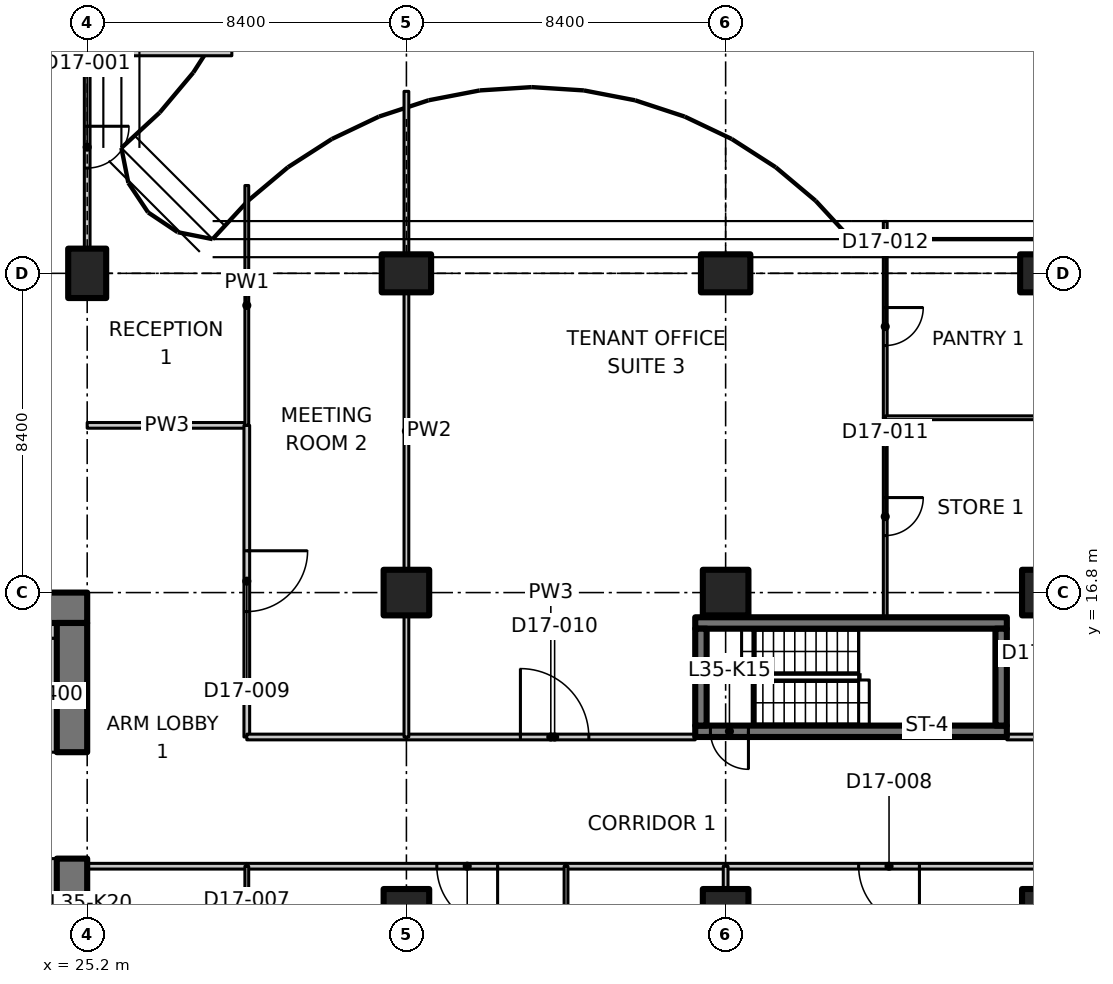
"""IFC4 building model, lengths in metres.
Left out: names, types, materials, properties, quantities, classifications, styles, units other than length and angle.
Written with IfcOpenShell. Run it as: python <this file> out.ifc"""

import sys

from ifc_helpers import new_model, si_unit, direction, frame, frame_2d, origin, origin_2d, place, context, subcontext, project, spatial, polyline, rectangle, outline, extrude, element, fill, save


model = new_model("IFC4")
c1 = context("Model", 3, precision=1e-05, world=origin(), true_north=direction((0.0, 1.0)))
c2 = subcontext(c1, "Body", "Model", "MODEL_VIEW")
j1 = project(units=[si_unit("LENGTHUNIT", "METRE"), si_unit("PLANEANGLEUNIT", "RADIAN")], contexts=[c1])
p1 = place(None, origin())
s1 = spatial("IfcSite", under=j1, at=p1, CompositionType="ELEMENT")
p2 = place(p1, origin())
s2 = spatial("IfcBuilding", under=s1, at=p2, CompositionType="ELEMENT")
p3 = place(p2, frame((0.0, 0.0, 142.1)))
s3 = spatial("IfcBuildingStorey", under=s2, at=p3, CompositionType="ELEMENT", Elevation=142.1)
p4 = place(p3, frame((25.2, 25.2, 0.0), z_axis=(0.0, 0.0, 1.0), x_axis=(1.0, 0.0, 0.0)))
e1 = element("IfcColumn", 1, at=p4, inside=s3, PredefinedType="COLUMN", context=c2, shape_type="SweptSolid", body=[
    extrude(rectangle(XDim=1.0, YDim=1.3, at=origin_2d()), origin(), (0.0, 0.0, 1.0), 3.35),
])
for number, where, z_axis, x_axis in (
    (2, (33.6, 8.4, 0.0), (0.0, 0.0, 1.0), (1.0, 0.0, 0.0)),
    (3, (33.6, 16.8, 0.0), (0.0, 0.0, 1.0), (1.0, 0.0, 0.0)),
):
    element("IfcColumn", number, at=place(p3, frame(where, z_axis=z_axis, x_axis=x_axis)), inside=s3, PredefinedType="COLUMN", context=c2, shape_type="SweptSolid", body=[
        extrude(rectangle(XDim=1.2, YDim=1.2, at=origin_2d()), origin(), (0.0, 0.0, 1.0), 3.35),
    ])
p5 = place(p3, frame((33.6, 25.2, 0.0), z_axis=(0.0, 0.0, 1.0), x_axis=(0.0, 1.0, 0.0)))
e4 = element("IfcColumn", 4, at=p5, inside=s3, PredefinedType="COLUMN", context=c2, shape_type="SweptSolid", body=[
    extrude(rectangle(XDim=1.0, YDim=1.3, at=origin_2d()), origin(), (0.0, 0.0, 1.0), 3.35),
])
for number, where, z_axis, x_axis in (
    (5, (42.0, 8.4, 0.0), (0.0, 0.0, 1.0), (1.0, 0.0, 0.0)),
    (6, (42.0, 16.8, 0.0), (0.0, 0.0, 1.0), (1.0, 0.0, 0.0)),
):
    element("IfcColumn", number, at=place(p3, frame(where, z_axis=z_axis, x_axis=x_axis)), inside=s3, PredefinedType="COLUMN", context=c2, shape_type="SweptSolid", body=[
        extrude(rectangle(XDim=1.2, YDim=1.2, at=origin_2d()), origin(), (0.0, 0.0, 1.0), 3.35),
    ])
p6 = place(p3, frame((42.0, 25.2, 0.0), z_axis=(0.0, 0.0, 1.0), x_axis=(0.0, 1.0, 0.0)))
e7 = element("IfcColumn", 7, at=p6, inside=s3, PredefinedType="COLUMN", context=c2, shape_type="SweptSolid", body=[
    extrude(rectangle(XDim=1.0, YDim=1.3, at=origin_2d()), origin(), (0.0, 0.0, 1.0), 3.35),
])
for number, where, z_axis, x_axis in (
    (8, (50.4, 8.4, 0.0), (0.0, 0.0, 1.0), (1.0, 0.0, 0.0)),
    (9, (50.4, 16.8, 0.0), (0.0, 0.0, 1.0), (1.0, 0.0, 0.0)),
):
    element("IfcColumn", number, at=place(p3, frame(where, z_axis=z_axis, x_axis=x_axis)), inside=s3, PredefinedType="COLUMN", context=c2, shape_type="SweptSolid", body=[
        extrude(rectangle(XDim=1.2, YDim=1.2, at=origin_2d()), origin(), (0.0, 0.0, 1.0), 3.35),
    ])
p7 = place(p3, frame((50.4, 25.2, 0.0), z_axis=(0.0, 0.0, 1.0), x_axis=(0.0, 1.0, 0.0)))
e10 = element("IfcColumn", 10, at=p7, inside=s3, PredefinedType="COLUMN", context=c2, shape_type="SweptSolid", body=[
    extrude(rectangle(XDim=1.0, YDim=1.3, at=origin_2d()), origin(), (0.0, 0.0, 1.0), 3.35),
])
p8 = place(p3, frame((23.8, 16.4, 0.0), z_axis=(0.0, 0.0, 1.0), x_axis=(1.0, 0.0, 0.0)))
e11 = element("IfcWall", 11, at=p8, inside=s3, PredefinedType="SHEAR", context=c2, shape_type="SweptSolid", body=[
    extrude(rectangle(XDim=1.4, YDim=0.8, at=frame_2d((0.7, 0.0))), origin(), (0.0, 0.0, 1.0), 3.35),
])
p9 = place(p3, frame((24.8, 0.8, 0.0), z_axis=(0.0, 0.0, 1.0), x_axis=(0.0, 1.0, 0.0)))
e12 = element("IfcWall", 12, at=p9, inside=s3, PredefinedType="SHEAR", context=c2, shape_type="SweptSolid", body=[
    extrude(rectangle(XDim=9.0, YDim=0.8, at=frame_2d((4.5, 0.0))), origin(), (0.0, 0.0, 1.0), 3.35),
])
p10 = place(p3, frame((24.8, 12.6, 0.0), z_axis=(0.0, 0.0, 1.0), x_axis=(0.0, 1.0, 0.0)))
e13 = element("IfcWall", 13, at=p10, inside=s3, PredefinedType="SHEAR", context=c2, shape_type="SweptSolid", body=[
    extrude(rectangle(XDim=3.4, YDim=0.8, at=frame_2d((1.7, 0.0))), origin(), (0.0, 0.0, 1.0), 3.35),
])
p11 = place(p3, frame((24.2, 12.6, 0.0), z_axis=(0.0, 0.0, 1.0), x_axis=(0.0, 1.0, 0.0)))
e14 = element("IfcWall", 14, at=p11, inside=s3, PredefinedType="PARTITIONING", context=c2, shape_type="SweptSolid", body=[
    extrude(rectangle(XDim=3.0, YDim=0.4, at=frame_2d((1.5, 0.0))), origin(), (0.0, 0.0, 1.0), 3.35),
])
p12 = place(p3, frame((23.8, 15.8, 0.0), z_axis=(0.0, 0.0, 1.0), x_axis=(1.0, 0.0, 0.0)))
e15 = element("IfcWall", 15, at=p12, inside=s3, PredefinedType="PARTITIONING", context=c2, shape_type="SweptSolid", body=[
    extrude(rectangle(XDim=0.6, YDim=0.4, at=frame_2d((0.3, 0.0))), origin(), (0.0, 0.0, 1.0), 3.35),
])
p13 = place(p3, frame((49.4, 13.15, 0.0), z_axis=(0.0, 0.0, 1.0), x_axis=(-1.0, 0.0, 0.0)))
e16 = element("IfcWall", 16, at=p13, inside=s3, PredefinedType="SHEAR", context=c2, shape_type="SweptSolid", body=[
    extrude(rectangle(XDim=8.2, YDim=0.3, at=frame_2d((4.1, 0.0))), origin(), (0.0, 0.0, 1.0), 3.35),
])
p14 = place(p13, frame((6.8, 0.0, 0.0)))
e17 = element("IfcOpeningElement", 17, at=p14, cuts=e16, PredefinedType="OPENING", context=c2, shape_type="SweptSolid", body=[
    extrude(rectangle(XDim=1.0, YDim=2.1, at=frame_2d((0.5, 1.05))), frame((0.0, 0.16, 0.0), z_axis=(0.0, -1.0, 0.0), x_axis=(1.0, 0.0, 0.0)), (0.0, 0.0, 1.0), 0.32),
])
p15 = place(p3, frame((41.2, 16.0, 0.0), z_axis=(0.0, 0.0, 1.0), x_axis=(1.0, 0.0, 0.0)))
e18 = element("IfcWall", 18, at=p15, inside=s3, PredefinedType="SHEAR", context=c2, shape_type="SweptSolid", body=[
    extrude(rectangle(XDim=8.2, YDim=0.3, at=frame_2d((4.1, 0.0))), origin(), (0.0, 0.0, 1.0), 3.35),
])
for number, where, z_axis, x_axis in (
    (19, (41.35, 13.3, 0.0), (0.0, 0.0, 1.0), (0.0, 1.0, 0.0)),
    (20, (49.25, 13.3, 0.0), (0.0, 0.0, 1.0), (0.0, 1.0, 0.0)),
):
    element("IfcWall", number, at=place(p3, frame(where, z_axis=z_axis, x_axis=x_axis)), inside=s3, PredefinedType="SHEAR", context=c2, shape_type="SweptSolid", body=[
        extrude(rectangle(XDim=2.55, YDim=0.3, at=frame_2d((1.275, 0.0))), origin(), (0.0, 0.0, 1.0), 3.35),
    ])
p16 = place(p3, frame((24.2, 4.35, 0.0), z_axis=(0.0, 0.0, 1.0), x_axis=(0.0, 1.0, 0.0)))
e21 = element("IfcWall", 21, at=p16, inside=s3, PredefinedType="PARTITIONING", context=c2, shape_type="SweptSolid", body=[
    extrude(rectangle(XDim=5.45, YDim=0.4, at=frame_2d((2.725, 0.0))), origin(), (0.0, 0.0, 1.0), 3.35),
])
for number, where, z_axis, x_axis in (
    (22, (25.2, 21.2, 0.0), (0.0, 0.0, 1.0), (1.0, 0.0, 0.0)),
    (23, (29.4, 9.6, 0.0), (0.0, 0.0, 1.0), (-1.0, 0.0, 0.0)),
):
    element("IfcWall", number, at=place(p3, frame(where, z_axis=z_axis, x_axis=x_axis)), inside=s3, PredefinedType="PARTITIONING", context=c2, shape_type="SweptSolid", body=[
        extrude(rectangle(XDim=4.2, YDim=0.15, at=frame_2d((2.1, 0.0))), origin(), (0.0, 0.0, 1.0), 3.33),
    ])
p17 = place(p3, frame((29.4, 21.2, 0.0), z_axis=(0.0, 0.0, 1.0), x_axis=(0.0, -1.0, 0.0)))
e24 = element("IfcWall", 24, at=p17, inside=s3, PredefinedType="PARTITIONING", context=c2, shape_type="SweptSolid", body=[
    extrude(rectangle(XDim=8.2, YDim=0.15, at=frame_2d((4.1, 0.0))), origin(), (0.0, 0.0, 1.0), 3.33),
])
p18 = place(p17, frame((3.3, 0.0, 0.0)))
e25 = element("IfcOpeningElement", 25, at=p18, cuts=e24, PredefinedType="OPENING", context=c2, shape_type="SweptSolid", body=[
    extrude(rectangle(XDim=1.6, YDim=2.1, at=frame_2d((0.8, 1.05))), frame((0.0, 0.085, 0.0), z_axis=(0.0, -1.0, 0.0), x_axis=(1.0, 0.0, 0.0)), (0.0, 0.0, 1.0), 0.17),
])
p19 = place(p3, frame((29.4, 27.511, 0.0), z_axis=(0.0, 0.0, 1.0), x_axis=(0.0, -1.0, 0.0)))
e26 = element("IfcWall", 26, at=p19, inside=s3, PredefinedType="PARTITIONING", context=c2, shape_type="SweptSolid", body=[
    extrude(outline(polyline([(0.0, 0.0), (6.311, 0.0), (6.311, 3.33), (2.761, 3.33), (2.759, 2.98), (1.863, 2.98), (1.861, 3.33), (0.236, 3.33), (0.0, 3.33), (0.0, 0.0)])), frame((0.0, 0.05, 0.0), z_axis=(0.0, -1.0, 0.0), x_axis=(1.0, 0.0, 0.0)), (0.0, 0.0, 1.0), 0.1),
])
p20 = place(p3, frame((25.2, 31.0, 0.0), z_axis=(0.0, 0.0, 1.0), x_axis=(0.0, -1.0, 0.0)))
e27 = element("IfcWall", 27, at=p20, inside=s3, PredefinedType="PARTITIONING", context=c2, shape_type="SweptSolid", body=[
    extrude(outline(polyline([(0.0, 0.0), (5.13, 0.0), (5.13, 2.98), (0.0, 2.98), (0.0, 0.0)])), frame((0.0, 0.075, 0.0), z_axis=(0.0, -1.0, 0.0), x_axis=(1.0, 0.0, 0.0)), (0.0, 0.0, 1.0), 0.15),
])
p21 = place(p20, frame((1.93, 0.0, 0.0)))
e28 = element("IfcOpeningElement", 28, at=p21, cuts=e27, PredefinedType="OPENING", context=c2, shape_type="SweptSolid", body=[
    extrude(rectangle(XDim=1.1, YDim=2.1, at=frame_2d((0.55, 1.05))), frame((0.0, 0.085, 0.0), z_axis=(0.0, -1.0, 0.0), x_axis=(1.0, 0.0, 0.0)), (0.0, 0.0, 1.0), 0.17),
])
p22 = place(p3, frame((25.2, 31.0, 0.0), z_axis=(0.0, 0.0, 1.0), x_axis=(1.0, 0.0, 0.0)))
e29 = element("IfcWall", 29, at=p22, inside=s3, PredefinedType="PARTITIONING", context=c2, shape_type="SweptSolid", body=[
    extrude(rectangle(XDim=3.806, YDim=0.15, at=frame_2d((1.903, 0.0))), origin(), (0.0, 0.0, 1.0), 2.98),
])
p23 = place(p3, frame((37.8, 9.6, 0.0), z_axis=(0.0, 0.0, 1.0), x_axis=(-1.0, 0.0, 0.0)))
e30 = element("IfcWall", 30, at=p23, inside=s3, PredefinedType="PARTITIONING", context=c2, shape_type="SweptSolid", body=[
    extrude(rectangle(XDim=8.4, YDim=0.15, at=frame_2d((4.2, 0.0))), origin(), (0.0, 0.0, 1.0), 3.33),
])
p24 = place(p23, frame((1.8, 0.0, 0.0)))
e31 = element("IfcOpeningElement", 31, at=p24, cuts=e30, PredefinedType="OPENING", context=c2, shape_type="SweptSolid", body=[
    extrude(rectangle(XDim=1.6, YDim=2.1, at=frame_2d((0.8, 1.05))), frame((0.0, 0.085, 0.0), z_axis=(0.0, -1.0, 0.0), x_axis=(1.0, 0.0, 0.0)), (0.0, 0.0, 1.0), 0.17),
])
p25 = place(p3, frame((42.0, 9.6, 0.0), z_axis=(0.0, 0.0, 1.0), x_axis=(-1.0, 0.0, 0.0)))
e32 = element("IfcWall", 32, at=p25, inside=s3, PredefinedType="PARTITIONING", context=c2, shape_type="SweptSolid", body=[
    extrude(rectangle(XDim=4.2, YDim=0.15, at=frame_2d((2.1, 0.0))), origin(), (0.0, 0.0, 1.0), 3.33),
])
p26 = place(p3, frame((50.4, 9.6, 0.0), z_axis=(0.0, 0.0, 1.0), x_axis=(-1.0, 0.0, 0.0)))
e33 = element("IfcWall", 33, at=p26, inside=s3, PredefinedType="PARTITIONING", context=c2, shape_type="SweptSolid", body=[
    extrude(rectangle(XDim=8.4, YDim=0.15, at=frame_2d((4.2, 0.0))), origin(), (0.0, 0.0, 1.0), 3.33),
])
p27 = place(p26, frame((3.3, 0.0, 0.0)))
e34 = element("IfcOpeningElement", 34, at=p27, cuts=e33, PredefinedType="OPENING", context=c2, shape_type="SweptSolid", body=[
    extrude(rectangle(XDim=1.6, YDim=2.1, at=frame_2d((0.8, 1.05))), frame((0.0, 0.085, 0.0), z_axis=(0.0, -1.0, 0.0), x_axis=(1.0, 0.0, 0.0)), (0.0, 0.0, 1.0), 0.17),
])
p28 = place(p3, frame((29.4, 13.0, 0.0), z_axis=(0.0, 0.0, 1.0), x_axis=(1.0, 0.0, 0.0)))
e35 = element("IfcWall", 35, at=p28, inside=s3, PredefinedType="PARTITIONING", context=c2, shape_type="SweptSolid", body=[
    extrude(rectangle(XDim=4.2, YDim=0.15, at=frame_2d((2.1, 0.0))), origin(), (0.0, 0.0, 1.0), 3.33),
])
p29 = place(p3, frame((33.6, 13.0, 0.0), z_axis=(0.0, 0.0, 1.0), x_axis=(1.0, 0.0, 0.0)))
e36 = element("IfcWall", 36, at=p29, inside=s3, PredefinedType="PARTITIONING", context=c2, shape_type="SweptSolid", body=[
    extrude(rectangle(XDim=7.6, YDim=0.15, at=frame_2d((3.8, 0.0))), origin(), (0.0, 0.0, 1.0), 3.33),
])
p30 = place(p29, frame((3.0, 0.0, 0.0)))
e37 = element("IfcOpeningElement", 37, at=p30, cuts=e36, PredefinedType="OPENING", context=c2, shape_type="SweptSolid", body=[
    extrude(rectangle(XDim=1.8, YDim=2.1, at=frame_2d((0.9, 1.05))), frame((0.0, 0.085, 0.0), z_axis=(0.0, -1.0, 0.0), x_axis=(1.0, 0.0, 0.0)), (0.0, 0.0, 1.0), 0.17),
])
p31 = place(p3, frame((49.4, 13.0, 0.0), z_axis=(0.0, 0.0, 1.0), x_axis=(1.0, 0.0, 0.0)))
e38 = element("IfcWall", 38, at=p31, inside=s3, PredefinedType="PARTITIONING", context=c2, shape_type="SweptSolid", body=[
    extrude(rectangle(XDim=1.0, YDim=0.15, at=frame_2d((0.5, 0.0))), origin(), (0.0, 0.0, 1.0), 3.33),
])
p32 = place(p3, frame((37.8, 9.6, 0.0), z_axis=(0.0, 0.0, 1.0), x_axis=(0.0, -1.0, 0.0)))
e39 = element("IfcWall", 39, at=p32, inside=s3, PredefinedType="PARTITIONING", context=c2, shape_type="SweptSolid", body=[
    extrude(rectangle(XDim=7.2, YDim=0.1, at=frame_2d((3.6, 0.0))), origin(), (0.0, 0.0, 1.0), 3.33),
])
p33 = place(p32, frame((3.0, 0.0, 0.0)))
e40 = element("IfcOpeningElement", 40, at=p33, cuts=e39, PredefinedType="OPENING", context=c2, shape_type="SweptSolid", body=[
    extrude(rectangle(XDim=1.0, YDim=2.1, at=frame_2d((0.5, 1.05))), frame((0.0, 0.06, 0.0), z_axis=(0.0, -1.0, 0.0), x_axis=(1.0, 0.0, 0.0)), (0.0, 0.0, 1.0), 0.12),
])
p34 = place(p3, frame((29.4, 3.6, 0.0), z_axis=(0.0, 0.0, 1.0), x_axis=(0.0, 1.0, 0.0)))
e41 = element("IfcWall", 41, at=p34, inside=s3, PredefinedType="PARTITIONING", context=c2, shape_type="SweptSolid", body=[
    extrude(rectangle(XDim=6.0, YDim=0.1, at=frame_2d((3.0, 0.0))), origin(), (0.0, 0.0, 1.0), 3.33),
])
p35 = place(p34, frame((2.4, 0.0, 0.0)))
e42 = element("IfcOpeningElement", 42, at=p35, cuts=e41, PredefinedType="OPENING", context=c2, shape_type="SweptSolid", body=[
    extrude(rectangle(XDim=1.0, YDim=2.1, at=frame_2d((0.5, 1.05))), frame((0.0, 0.06, 0.0), z_axis=(0.0, -1.0, 0.0), x_axis=(1.0, 0.0, 0.0)), (0.0, 0.0, 1.0), 0.12),
])
p36 = place(p3, frame((42.0, 9.6, 0.0), z_axis=(0.0, 0.0, 1.0), x_axis=(0.0, -1.0, 0.0)))
e43 = element("IfcWall", 43, at=p36, inside=s3, PredefinedType="PARTITIONING", context=c2, shape_type="SweptSolid", body=[
    extrude(rectangle(XDim=0.58, YDim=0.125, at=frame_2d((0.29, 0.0))), origin(), (0.0, 0.0, 1.0), 3.33),
])
p37 = place(p3, frame((33.6, 29.988, 0.0), z_axis=(0.0, 0.0, 1.0), x_axis=(0.0, -1.0, 0.0)))
e44 = element("IfcWall", 44, at=p37, inside=s3, PredefinedType="PARTITIONING", context=c2, shape_type="SweptSolid", body=[
    extrude(rectangle(XDim=4.268, YDim=0.125, at=frame_2d((2.134, 0.0))), origin(), (0.0, 0.0, 1.0), 2.98),
])
p38 = place(p3, frame((33.6, 24.68, 0.0), z_axis=(0.0, 0.0, 1.0), x_axis=(0.0, -1.0, 0.0)))
e45 = element("IfcWall", 45, at=p38, inside=s3, PredefinedType="PARTITIONING", context=c2, shape_type="SweptSolid", body=[
    extrude(rectangle(XDim=7.26, YDim=0.125, at=frame_2d((3.63, 0.0))), origin(), (0.0, 0.0, 1.0), 3.33),
])
p39 = place(p3, frame((33.6, 16.18, 0.0), z_axis=(0.0, 0.0, 1.0), x_axis=(0.0, -1.0, 0.0)))
e46 = element("IfcWall", 46, at=p39, inside=s3, PredefinedType="PARTITIONING", context=c2, shape_type="SweptSolid", body=[
    extrude(rectangle(XDim=3.18, YDim=0.125, at=frame_2d((1.59, 0.0))), origin(), (0.0, 0.0, 1.0), 3.33),
])
p40 = place(p3, frame((46.2, 21.4, 0.0), z_axis=(0.0, 0.0, 1.0), x_axis=(0.0, -1.0, 0.0)))
e47 = element("IfcWall", 47, at=p40, inside=s3, PredefinedType="PARTITIONING", context=c2, shape_type="SweptSolid", body=[
    extrude(rectangle(XDim=5.25, YDim=0.1, at=frame_2d((2.625, 0.0))), origin(), (0.0, 0.0, 1.0), 3.33),
])
p41 = place(p40, frame((2.1, 0.0, 0.0)))
e48 = element("IfcOpeningElement", 48, at=p41, cuts=e47, PredefinedType="OPENING", context=c2, shape_type="SweptSolid", body=[
    extrude(rectangle(XDim=1.0, YDim=2.1, at=frame_2d((0.5, 1.05))), frame((0.0, 0.06, 0.0), z_axis=(0.0, -1.0, 0.0), x_axis=(1.0, 0.0, 0.0)), (0.0, 0.0, 1.0), 0.12),
])
p42 = place(p3, frame((46.2, 26.565, 0.0), z_axis=(0.0, 0.0, 1.0), x_axis=(0.0, -1.0, 0.0)))
e49 = element("IfcWall", 49, at=p42, inside=s3, PredefinedType="PARTITIONING", context=c2, shape_type="SweptSolid", body=[
    extrude(outline(polyline([(0.0, 0.0), (5.165, 0.0), (5.165, 3.33), (1.815, 3.33), (1.813, 2.98), (0.917, 2.98), (0.915, 3.33), (0.265, 3.33), (0.0, 3.33), (0.0, 0.0)])), frame((0.0, 0.05, 0.0), z_axis=(0.0, -1.0, 0.0), x_axis=(1.0, 0.0, 0.0)), (0.0, 0.0, 1.0), 0.1),
])
p43 = place(p42, frame((2.265, 0.0, 0.0)))
e50 = element("IfcOpeningElement", 50, at=p43, cuts=e49, PredefinedType="OPENING", context=c2, shape_type="SweptSolid", body=[
    extrude(rectangle(XDim=1.0, YDim=2.1, at=frame_2d((0.5, 1.05))), frame((0.0, 0.06, 0.0), z_axis=(0.0, -1.0, 0.0), x_axis=(1.0, 0.0, 0.0)), (0.0, 0.0, 1.0), 0.12),
])
p44 = place(p3, frame((46.2, 21.4, 0.0), z_axis=(0.0, 0.0, 1.0), x_axis=(1.0, 0.0, 0.0)))
e51 = element("IfcWall", 51, at=p44, inside=s3, PredefinedType="PARTITIONING", context=c2, shape_type="SweptSolid", body=[
    extrude(rectangle(XDim=4.2, YDim=0.1, at=frame_2d((2.1, 0.0))), origin(), (0.0, 0.0, 1.0), 3.33),
])
p45 = place(p14, origin())
e52 = element("IfcDoor", 52, at=p45, inside=s3, OperationType="SINGLE_SWING_LEFT", PredefinedType="DOOR", context=c2, shape_type="SweptSolid", body=[
    extrude(rectangle(XDim=1.0, YDim=2.1, at=frame_2d((0.5, 1.05))), frame((0.0, 0.025, 0.0), z_axis=(0.0, -1.0, 0.0), x_axis=(1.0, 0.0, 0.0)), (0.0, 0.0, 1.0), 0.05),
])
fill(e17, e52)
p46 = place(p21, origin())
e53 = element("IfcDoor", 53, at=p46, inside=s3, OperationType="SINGLE_SWING_RIGHT", PredefinedType="DOOR", context=c2, shape_type="SweptSolid", body=[
    extrude(rectangle(XDim=1.1, YDim=2.1, at=frame_2d((0.55, 1.05))), frame((0.0, 0.025, 0.0), z_axis=(0.0, -1.0, 0.0), x_axis=(1.0, 0.0, 0.0)), (0.0, 0.0, 1.0), 0.05),
])
fill(e28, e53)
p47 = place(p24, origin())
e54 = element("IfcDoor", 54, at=p47, inside=s3, OperationType="DOUBLE_DOOR_SINGLE_SWING", PredefinedType="DOOR", context=c2, shape_type="SweptSolid", body=[
    extrude(rectangle(XDim=1.6, YDim=2.1, at=frame_2d((0.8, 1.05))), frame((0.0, 0.025, 0.0), z_axis=(0.0, -1.0, 0.0), x_axis=(1.0, 0.0, 0.0)), (0.0, 0.0, 1.0), 0.05),
])
fill(e31, e54)
p48 = place(p27, origin())
e55 = element("IfcDoor", 55, at=p48, inside=s3, OperationType="DOUBLE_DOOR_SINGLE_SWING", PredefinedType="DOOR", context=c2, shape_type="SweptSolid", body=[
    extrude(rectangle(XDim=1.6, YDim=2.1, at=frame_2d((0.8, 1.05))), frame((0.0, 0.025, 0.0), z_axis=(0.0, -1.0, 0.0), x_axis=(1.0, 0.0, 0.0)), (0.0, 0.0, 1.0), 0.05),
])
fill(e34, e55)
p49 = place(p18, origin())
e56 = element("IfcDoor", 56, at=p49, inside=s3, OperationType="DOUBLE_DOOR_SINGLE_SWING", PredefinedType="DOOR", context=c2, shape_type="SweptSolid", body=[
    extrude(rectangle(XDim=1.6, YDim=2.1, at=frame_2d((0.8, 1.05))), frame((0.0, 0.025, 0.0), z_axis=(0.0, -1.0, 0.0), x_axis=(1.0, 0.0, 0.0)), (0.0, 0.0, 1.0), 0.05),
])
fill(e25, e56)
p50 = place(p30, origin())
e57 = element("IfcDoor", 57, at=p50, inside=s3, OperationType="DOUBLE_DOOR_SINGLE_SWING", PredefinedType="DOOR", context=c2, shape_type="SweptSolid", body=[
    extrude(rectangle(XDim=1.8, YDim=2.1, at=frame_2d((0.9, 1.05))), frame((0.0, 0.025, 0.0), z_axis=(0.0, -1.0, 0.0), x_axis=(1.0, 0.0, 0.0)), (0.0, 0.0, 1.0), 0.05),
])
fill(e37, e57)
p51 = place(p41, origin())
e58 = element("IfcDoor", 58, at=p51, inside=s3, OperationType="SINGLE_SWING_LEFT", PredefinedType="DOOR", context=c2, shape_type="SweptSolid", body=[
    extrude(rectangle(XDim=1.0, YDim=2.1, at=frame_2d((0.5, 1.05))), frame((0.0, 0.025, 0.0), z_axis=(0.0, -1.0, 0.0), x_axis=(1.0, 0.0, 0.0)), (0.0, 0.0, 1.0), 0.05),
])
fill(e48, e58)
p52 = place(p43, origin())
e59 = element("IfcDoor", 59, at=p52, inside=s3, OperationType="SINGLE_SWING_LEFT", PredefinedType="DOOR", context=c2, shape_type="SweptSolid", body=[
    extrude(rectangle(XDim=1.0, YDim=2.1, at=frame_2d((0.5, 1.05))), frame((0.0, 0.025, 0.0), z_axis=(0.0, -1.0, 0.0), x_axis=(1.0, 0.0, 0.0)), (0.0, 0.0, 1.0), 0.05),
])
fill(e50, e59)
save(model, sys.argv[1])
